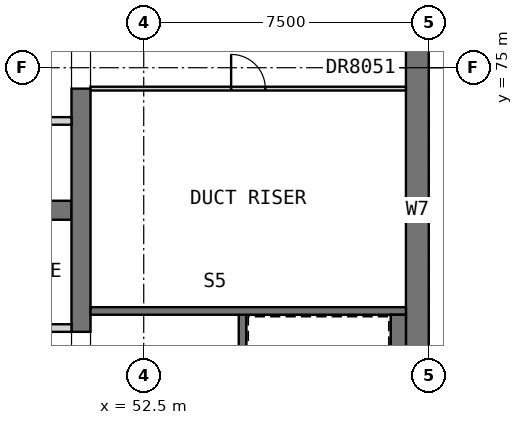
"""IFC4 building model, lengths in metres.
Left out: names, types, materials, properties, quantities, classifications, styles, units other than length and angle.
Written with IfcOpenShell. Run it as: python <this file> out.ifc"""

import sys

from ifc_helpers import new_model, si_unit, direction, frame, frame_2d, origin, place, context, subcontext, project, spatial, rectangle, extrude, element, fill, save


model = new_model("IFC4")
c1 = context("Model", 3, precision=1e-05, world=origin(), true_north=direction((0.0, 1.0)))
c2 = subcontext(c1, "Body", "Model", "MODEL_VIEW")
j1 = project(units=[si_unit("LENGTHUNIT", "METRE"), si_unit("PLANEANGLEUNIT", "RADIAN")], contexts=[c1])
p1 = place(None, origin())
s1 = spatial("IfcSite", under=j1, at=p1, CompositionType="ELEMENT")
p2 = place(p1, origin())
s2 = spatial("IfcBuilding", under=s1, at=p2, CompositionType="ELEMENT")
p3 = place(p2, frame((0.0, 0.0, 233.7)))
s3 = spatial("IfcBuildingStorey", under=s2, at=p3, CompositionType="ELEMENT", Elevation=233.7)
p4 = place(p3, frame((59.7, 60.6, 0.0), z_axis=(0.0, 0.0, 1.0), x_axis=(0.0, 1.0, 0.0)))
e1 = element("IfcWall", 1, at=p4, inside=s3, PredefinedType="SHEAR", context=c2, shape_type="SweptSolid", body=[
    extrude(rectangle(XDim=21.3, YDim=0.6, at=frame_2d((10.65, 0.0))), origin(), (0.0, 0.0, 1.0), 3.5),
])
p5 = place(p4, frame((14.9, 0.0, 0.0)))
e2 = element("IfcOpeningElement", 2, at=p5, cuts=e1, PredefinedType="OPENING", context=c2, shape_type="SweptSolid", body=[
    extrude(rectangle(XDim=1.8, YDim=2.1, at=frame_2d((0.9, 1.05))), frame((0.0, 0.31, 0.0), z_axis=(0.0, -1.0, 0.0), x_axis=(1.0, 0.0, 0.0)), (0.0, 0.0, 1.0), 0.62),
])
p6 = place(p3, frame((35.0, 71.25, 0.0), z_axis=(0.0, 0.0, 1.0), x_axis=(1.0, 0.0, 0.0)))
e3 = element("IfcWall", 3, at=p6, inside=s3, PredefinedType="SHEAR", context=c2, shape_type="SweptSolid", body=[
    extrude(rectangle(XDim=15.6, YDim=0.5, at=frame_2d((7.8, 0.0))), origin(), (0.0, 0.0, 1.0), 3.5),
])
p7 = place(p3, frame((50.85, 68.05, 0.0), z_axis=(0.0, 0.0, 1.0), x_axis=(0.0, 1.0, 0.0)))
e4 = element("IfcWall", 4, at=p7, inside=s3, PredefinedType="SHEAR", context=c2, shape_type="SweptSolid", body=[
    extrude(rectangle(XDim=6.4, YDim=0.5, at=frame_2d((3.2, 0.0))), origin(), (0.0, 0.0, 1.0), 3.5),
])
p8 = place(p3, frame((35.0, 68.15, 0.0), z_axis=(0.0, 0.0, 1.0), x_axis=(1.0, 0.0, 0.0)))
e5 = element("IfcWall", 5, at=p8, inside=s3, PredefinedType="PARTITIONING", context=c2, shape_type="SweptSolid", body=[
    extrude(rectangle(XDim=15.6, YDim=0.2, at=frame_2d((7.8, 0.0))), origin(), (0.0, 0.0, 1.0), 3.25),
])
p9 = place(p8, frame((1.5, 0.0, 0.0)))
e6 = element("IfcOpeningElement", 6, at=p9, cuts=e5, PredefinedType="OPENING", context=c2, shape_type="SweptSolid", body=[
    extrude(rectangle(XDim=0.9, YDim=2.1, at=frame_2d((0.45, 1.05))), frame((0.0, 0.11, 0.0), z_axis=(0.0, -1.0, 0.0), x_axis=(1.0, 0.0, 0.0)), (0.0, 0.0, 1.0), 0.22),
])
p10 = place(p8, frame((7.35, 0.0, 0.0)))
e7 = element("IfcOpeningElement", 7, at=p10, cuts=e5, PredefinedType="OPENING", context=c2, shape_type="SweptSolid", body=[
    extrude(rectangle(XDim=0.9, YDim=2.1, at=frame_2d((0.45, 1.05))), frame((0.0, 0.11, 0.0), z_axis=(0.0, -1.0, 0.0), x_axis=(1.0, 0.0, 0.0)), (0.0, 0.0, 1.0), 0.22),
])
p11 = place(p8, frame((13.2, 0.0, 0.0)))
e8 = element("IfcOpeningElement", 8, at=p11, cuts=e5, PredefinedType="OPENING", context=c2, shape_type="SweptSolid", body=[
    extrude(rectangle(XDim=0.9, YDim=2.1, at=frame_2d((0.45, 1.05))), frame((0.0, 0.11, 0.0), z_axis=(0.0, -1.0, 0.0), x_axis=(1.0, 0.0, 0.0)), (0.0, 0.0, 1.0), 0.22),
])
p12 = place(p3, frame((35.0, 73.6, 0.0), z_axis=(0.0, 0.0, 1.0), x_axis=(1.0, 0.0, 0.0)))
e9 = element("IfcWall", 9, at=p12, inside=s3, PredefinedType="SOLIDWALL", context=c2, shape_type="SweptSolid", body=[
    extrude(rectangle(XDim=15.6, YDim=0.2, at=frame_2d((7.8, 0.0))), origin(), (0.0, 0.0, 1.0), 3.5),
])
p13 = place(p12, frame((0.75, 0.0, 0.0)))
e10 = element("IfcOpeningElement", 10, at=p13, cuts=e9, PredefinedType="OPENING", context=c2, shape_type="SweptSolid", body=[
    extrude(rectangle(XDim=1.1, YDim=2.1, at=frame_2d((0.55, 1.05))), frame((0.0, 0.11, 0.0), z_axis=(0.0, -1.0, 0.0), x_axis=(1.0, 0.0, 0.0)), (0.0, 0.0, 1.0), 0.22),
])
p14 = place(p12, frame((3.35, 0.0, 0.0)))
e11 = element("IfcOpeningElement", 11, at=p14, cuts=e9, PredefinedType="OPENING", context=c2, shape_type="SweptSolid", body=[
    extrude(rectangle(XDim=1.1, YDim=2.1, at=frame_2d((0.55, 1.05))), frame((0.0, 0.11, 0.0), z_axis=(0.0, -1.0, 0.0), x_axis=(1.0, 0.0, 0.0)), (0.0, 0.0, 1.0), 0.22),
])
p15 = place(p12, frame((5.95, 0.0, 0.0)))
e12 = element("IfcOpeningElement", 12, at=p15, cuts=e9, PredefinedType="OPENING", context=c2, shape_type="SweptSolid", body=[
    extrude(rectangle(XDim=1.1, YDim=2.1, at=frame_2d((0.55, 1.05))), frame((0.0, 0.11, 0.0), z_axis=(0.0, -1.0, 0.0), x_axis=(1.0, 0.0, 0.0)), (0.0, 0.0, 1.0), 0.22),
])
p16 = place(p12, frame((8.55, 0.0, 0.0)))
e13 = element("IfcOpeningElement", 13, at=p16, cuts=e9, PredefinedType="OPENING", context=c2, shape_type="SweptSolid", body=[
    extrude(rectangle(XDim=1.1, YDim=2.1, at=frame_2d((0.55, 1.05))), frame((0.0, 0.11, 0.0), z_axis=(0.0, -1.0, 0.0), x_axis=(1.0, 0.0, 0.0)), (0.0, 0.0, 1.0), 0.22),
])
p17 = place(p12, frame((11.15, 0.0, 0.0)))
e14 = element("IfcOpeningElement", 14, at=p17, cuts=e9, PredefinedType="OPENING", context=c2, shape_type="SweptSolid", body=[
    extrude(rectangle(XDim=1.1, YDim=2.1, at=frame_2d((0.55, 1.05))), frame((0.0, 0.11, 0.0), z_axis=(0.0, -1.0, 0.0), x_axis=(1.0, 0.0, 0.0)), (0.0, 0.0, 1.0), 0.22),
])
p18 = place(p12, frame((13.75, 0.0, 0.0)))
e15 = element("IfcOpeningElement", 15, at=p18, cuts=e9, PredefinedType="OPENING", context=c2, shape_type="SweptSolid", body=[
    extrude(rectangle(XDim=1.1, YDim=2.1, at=frame_2d((0.55, 1.05))), frame((0.0, 0.11, 0.0), z_axis=(0.0, -1.0, 0.0), x_axis=(1.0, 0.0, 0.0)), (0.0, 0.0, 1.0), 0.22),
])
p19 = place(p3, frame((55.1, 60.6, 0.0), z_axis=(0.0, 0.0, 1.0), x_axis=(0.0, 1.0, 0.0)))
e16 = element("IfcWall", 16, at=p19, inside=s3, PredefinedType="SOLIDWALL", context=c2, shape_type="SweptSolid", body=[
    extrude(rectangle(XDim=8.0, YDim=0.2, at=frame_2d((4.0, 0.0))), origin(), (0.0, 0.0, 1.0), 3.25),
])
p20 = place(p3, frame((51.1, 68.6, 0.0), z_axis=(0.0, 0.0, 1.0), x_axis=(1.0, 0.0, 0.0)))
e17 = element("IfcWall", 17, at=p20, inside=s3, PredefinedType="SOLIDWALL", context=c2, shape_type="SweptSolid", body=[
    extrude(rectangle(XDim=8.3, YDim=0.2, at=frame_2d((4.15, 0.0))), origin(), (0.0, 0.0, 1.0), 3.25),
])
p21 = place(p3, frame((59.2, 60.6, 0.0), z_axis=(0.0, 0.0, 1.0), x_axis=(0.0, 1.0, 0.0)))
e18 = element("IfcWall", 18, at=p21, inside=s3, PredefinedType="SOLIDWALL", context=c2, shape_type="SweptSolid", body=[
    extrude(rectangle(XDim=7.9, YDim=0.4, at=frame_2d((3.95, 0.0))), origin(), (0.0, 0.0, 1.0), 3.25),
])
p22 = place(p3, frame((51.1, 74.45, 0.0), z_axis=(0.0, 0.0, 1.0), x_axis=(1.0, 0.0, 0.0)))
e19 = element("IfcWall", 19, at=p22, inside=s3, PredefinedType="PARTITIONING", context=c2, shape_type="SweptSolid", body=[
    extrude(rectangle(XDim=8.3, YDim=0.1, at=frame_2d((4.15, 0.0))), origin(), (0.0, 0.0, 1.0), 3.25),
])
p23 = place(p22, frame((3.7, 0.0, 0.0)))
e20 = element("IfcOpeningElement", 20, at=p23, cuts=e19, PredefinedType="OPENING", context=c2, shape_type="SweptSolid", body=[
    extrude(rectangle(XDim=0.9, YDim=2.1, at=frame_2d((0.45, 1.05))), frame((0.0, 0.06, 0.0), z_axis=(0.0, -1.0, 0.0), x_axis=(1.0, 0.0, 0.0)), (0.0, 0.0, 1.0), 0.12),
])
p24 = place(p23, origin())
e21 = element("IfcDoor", 21, at=p24, inside=s3, OperationType="SINGLE_SWING_RIGHT", PredefinedType="DOOR", context=c2, shape_type="SweptSolid", body=[
    extrude(rectangle(XDim=0.9, YDim=2.1, at=frame_2d((0.45, 1.05))), frame((0.0, 0.025, 0.0), z_axis=(0.0, -1.0, 0.0), x_axis=(1.0, 0.0, 0.0)), (0.0, 0.0, 1.0), 0.05),
])
fill(e20, e21)
save(model, sys.argv[1])
